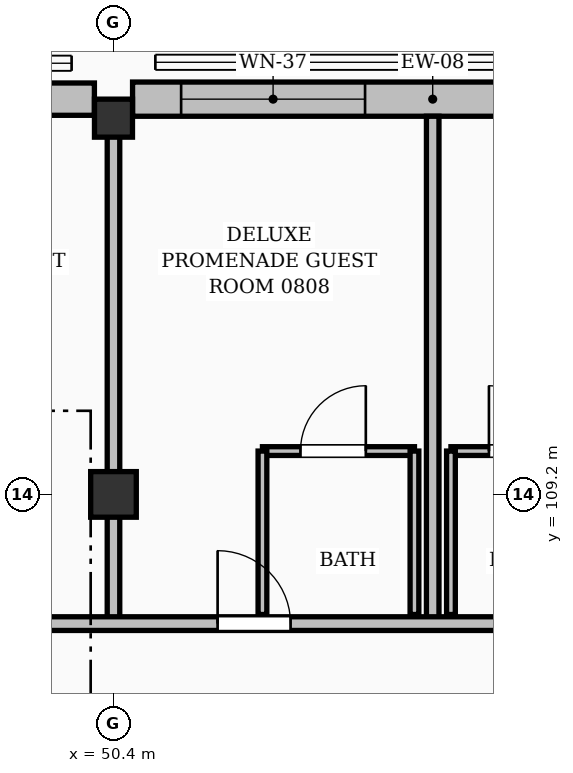
"""IFC4 building model, lengths in metres.
Left out: names, types, materials, properties, quantities, classifications, styles, units other than length and angle.
Written with IfcOpenShell. Run it as: python <this file> out.ifc"""

import sys

from ifc_helpers import new_model, si_unit, direction, frame, frame_2d, origin, origin_2d, place, context, subcontext, project, spatial, rectangle, extrude, element, fill, save


model = new_model("IFC4")
c1 = context("Model", 3, precision=1e-05, world=origin(), true_north=direction((0.0, 1.0)))
c2 = subcontext(c1, "Body", "Model", "MODEL_VIEW")
j1 = project(units=[si_unit("LENGTHUNIT", "METRE"), si_unit("PLANEANGLEUNIT", "RADIAN")], contexts=[c1])
p1 = place(None, origin())
s1 = spatial("IfcSite", under=j1, at=p1, CompositionType="ELEMENT")
p2 = place(p1, origin())
s2 = spatial("IfcBuilding", under=s1, at=p2, CompositionType="ELEMENT")
p3 = place(p2, frame((0.0, 0.0, 28.56)))
s3 = spatial("IfcBuildingStorey", under=s2, at=p3, CompositionType="ELEMENT", Elevation=28.56)
p4 = place(p3, frame((50.4, 109.2, 0.0), z_axis=(0.0, 0.0, 1.0), x_axis=(1.0, 0.0, 0.0)))
e1 = element("IfcColumn", 1, at=p4, inside=s3, PredefinedType="COLUMN", context=c2, shape_type="SweptSolid", body=[
    extrude(rectangle(XDim=0.6, YDim=0.6, at=origin_2d()), origin(), (0.0, 0.0, 1.0), 3.36),
])
p5 = place(p3, frame((50.4, 114.15, -0.315), z_axis=(0.0, 0.0, 1.0), x_axis=(1.0, 0.0, 0.0)))
e2 = element("IfcColumn", 2, at=p5, inside=s3, PredefinedType="COLUMN", context=c2, shape_type="SweptSolid", body=[
    extrude(rectangle(XDim=0.5, YDim=0.5, at=origin_2d()), origin(), (0.0, 0.0, 1.0), 3.675),
])
p6 = place(p3, frame((42.251, 114.4, 0.0), z_axis=(0.0, 0.0, 1.0), x_axis=(1.0, 0.0, 0.0)))
e3 = element("IfcWall", 3, at=p6, inside=s3, PredefinedType="SOLIDWALL", context=c2, shape_type="SweptSolid", body=[
    extrude(rectangle(XDim=7.898, YDim=0.425, at=frame_2d((3.949, 0.0))), origin(), (0.0, 0.0, 1.0), 2.494),
])
p7 = place(p6, frame((0.739, 0.0, 0.25)))
e4 = element("IfcOpeningElement", 4, at=p7, cuts=e3, PredefinedType="OPENING", context=c2, shape_type="SweptSolid", body=[
    extrude(rectangle(XDim=2.22, YDim=1.9, at=frame_2d((1.11, 0.95))), frame((0.0, 0.223, 0.0), z_axis=(0.0, -1.0, 0.0), x_axis=(1.0, 0.0, 0.0)), (0.0, 0.0, 1.0), 0.445),
])
p8 = place(p6, frame((4.839, 0.0, 0.25)))
e5 = element("IfcOpeningElement", 5, at=p8, cuts=e3, PredefinedType="OPENING", context=c2, shape_type="SweptSolid", body=[
    extrude(rectangle(XDim=2.42, YDim=1.9, at=frame_2d((1.21, 0.95))), frame((0.0, 0.223, 0.0), z_axis=(0.0, -1.0, 0.0), x_axis=(1.0, 0.0, 0.0)), (0.0, 0.0, 1.0), 0.445),
])
p9 = place(p3, frame((50.651, 114.4, 0.0), z_axis=(0.0, 0.0, 1.0), x_axis=(1.0, 0.0, 0.0)))
e6 = element("IfcWall", 6, at=p9, inside=s3, PredefinedType="SOLIDWALL", context=c2, shape_type="SweptSolid", body=[
    extrude(rectangle(XDim=7.898, YDim=0.45, at=frame_2d((3.949, 0.0))), origin(), (0.0, 0.0, 1.0), 2.494),
])
p10 = place(p9, frame((0.639, 0.0, 0.25)))
e7 = element("IfcOpeningElement", 7, at=p10, cuts=e6, PredefinedType="OPENING", context=c2, shape_type="SweptSolid", body=[
    extrude(rectangle(XDim=2.42, YDim=1.9, at=frame_2d((1.21, 0.95))), frame((0.0, 0.235, 0.0), z_axis=(0.0, -1.0, 0.0), x_axis=(1.0, 0.0, 0.0)), (0.0, 0.0, 1.0), 0.47),
])
p11 = place(p9, frame((4.859, 0.0, 0.25)))
e8 = element("IfcOpeningElement", 8, at=p11, cuts=e6, PredefinedType="OPENING", context=c2, shape_type="SweptSolid", body=[
    extrude(rectangle(XDim=2.38, YDim=2.0, at=frame_2d((1.19, 1.0))), frame((0.0, 0.235, 0.0), z_axis=(0.0, -1.0, 0.0), x_axis=(1.0, 0.0, 0.0)), (0.0, 0.0, 1.0), 0.47),
])
p12 = place(p3, frame((52.36, 109.77, 0.0), z_axis=(0.0, 0.0, 1.0), x_axis=(1.0, 0.0, 0.0)))
e9 = element("IfcWall", 9, at=p12, inside=s3, PredefinedType="PARTITIONING", context=c2, shape_type="SweptSolid", body=[
    extrude(rectangle(XDim=2.0, YDim=0.115, at=frame_2d((1.0, 0.0))), origin(), (0.0, 0.0, 1.0), 3.12),
])
p13 = place(p12, frame((0.5, 0.0, 0.0)))
e10 = element("IfcOpeningElement", 10, at=p13, cuts=e9, PredefinedType="OPENING", context=c2, shape_type="SweptSolid", body=[
    extrude(rectangle(XDim=0.86, YDim=2.05, at=frame_2d((0.43, 1.025))), frame((0.0, 0.067, 0.0), z_axis=(0.0, -1.0, 0.0), x_axis=(1.0, 0.0, 0.0)), (0.0, 0.0, 1.0), 0.135),
])
for number, where, z_axis, x_axis in (
    (11, (52.36, 107.62, 0.0), (0.0, 0.0, 1.0), (0.0, 1.0, 0.0)),
    (12, (54.36, 107.62, 0.0), (0.0, 0.0, 1.0), (0.0, 1.0, 0.0)),
):
    element("IfcWall", number, at=place(p3, frame(where, z_axis=z_axis, x_axis=x_axis)), inside=s3, PredefinedType="PARTITIONING", context=c2, shape_type="SweptSolid", body=[
        extrude(rectangle(XDim=2.15, YDim=0.115, at=frame_2d((1.075, 0.0))), origin(), (0.0, 0.0, 1.0), 3.12),
    ])
p14 = place(p3, frame((54.84, 109.77, 0.0), z_axis=(0.0, 0.0, 1.0), x_axis=(1.0, 0.0, 0.0)))
e13 = element("IfcWall", 13, at=p14, inside=s3, PredefinedType="PARTITIONING", context=c2, shape_type="SweptSolid", body=[
    extrude(rectangle(XDim=2.0, YDim=0.115, at=frame_2d((1.0, 0.0))), origin(), (0.0, 0.0, 1.0), 3.12),
])
p15 = place(p14, frame((0.5, 0.0, 0.0)))
e14 = element("IfcOpeningElement", 14, at=p15, cuts=e13, PredefinedType="OPENING", context=c2, shape_type="SweptSolid", body=[
    extrude(rectangle(XDim=0.86, YDim=2.05, at=frame_2d((0.43, 1.025))), frame((0.0, 0.067, 0.0), z_axis=(0.0, -1.0, 0.0), x_axis=(1.0, 0.0, 0.0)), (0.0, 0.0, 1.0), 0.135),
])
p16 = place(p3, frame((54.84, 107.62, 0.0), z_axis=(0.0, 0.0, 1.0), x_axis=(0.0, 1.0, 0.0)))
e15 = element("IfcWall", 15, at=p16, inside=s3, PredefinedType="PARTITIONING", context=c2, shape_type="SweptSolid", body=[
    extrude(rectangle(XDim=2.15, YDim=0.115, at=frame_2d((1.075, 0.0))), origin(), (0.0, 0.0, 1.0), 3.12),
])
p17 = place(p3, frame((54.6, 107.5, 0.0), z_axis=(0.0, 0.0, 1.0), x_axis=(0.0, 1.0, 0.0)))
e16 = element("IfcWall", 16, at=p17, inside=s3, PredefinedType="PARTITIONING", context=c2, shape_type="SweptSolid", body=[
    extrude(rectangle(XDim=6.675, YDim=0.165, at=frame_2d((3.337, 0.0))), origin(), (0.0, 0.0, 1.0), 3.12),
])
p18 = place(p3, frame((50.4, 107.5, 0.0), z_axis=(0.0, 0.0, 1.0), x_axis=(0.0, 1.0, 0.0)))
e17 = element("IfcWall", 17, at=p18, inside=s3, PredefinedType="PARTITIONING", context=c2, shape_type="SweptSolid", body=[
    extrude(rectangle(XDim=6.55, YDim=0.165, at=frame_2d((3.275, 0.0))), origin(), (0.0, 0.0, 1.0), 2.41),
])
p19 = place(p3, frame((40.66, 107.5, 0.0), z_axis=(0.0, 0.0, 1.0), x_axis=(1.0, 0.0, 0.0)))
e18 = element("IfcWall", 18, at=p19, inside=s3, PredefinedType="PARTITIONING", context=c2, shape_type="SweptSolid", body=[
    extrude(rectangle(XDim=26.378, YDim=0.18, at=frame_2d((13.189, 0.0))), origin(), (0.0, 0.0, 1.0), 3.12),
])
p20 = place(p19, frame((0.2, 0.0, 0.0)))
e19 = element("IfcOpeningElement", 19, at=p20, cuts=e18, PredefinedType="OPENING", context=c2, shape_type="SweptSolid", body=[
    extrude(rectangle(XDim=0.94, YDim=2.1, at=frame_2d((0.47, 1.05))), frame((0.0, 0.1, 0.0), z_axis=(0.0, -1.0, 0.0), x_axis=(1.0, 0.0, 0.0)), (0.0, 0.0, 1.0), 0.2),
])
p21 = place(p19, frame((2.71, 0.0, 0.0)))
e20 = element("IfcOpeningElement", 20, at=p21, cuts=e18, PredefinedType="OPENING", context=c2, shape_type="SweptSolid", body=[
    extrude(rectangle(XDim=0.96, YDim=2.15, at=frame_2d((0.48, 1.075))), frame((0.0, 0.1, 0.0), z_axis=(0.0, -1.0, 0.0), x_axis=(1.0, 0.0, 0.0)), (0.0, 0.0, 1.0), 0.2),
])
p22 = place(p19, frame((7.37, 0.0, 0.0)))
e21 = element("IfcOpeningElement", 21, at=p22, cuts=e18, PredefinedType="OPENING", context=c2, shape_type="SweptSolid", body=[
    extrude(rectangle(XDim=0.96, YDim=2.15, at=frame_2d((0.48, 1.075))), frame((0.0, 0.1, 0.0), z_axis=(0.0, -1.0, 0.0), x_axis=(1.0, 0.0, 0.0)), (0.0, 0.0, 1.0), 0.2),
])
p23 = place(p19, frame((11.11, 0.0, 0.0)))
e22 = element("IfcOpeningElement", 22, at=p23, cuts=e18, PredefinedType="OPENING", context=c2, shape_type="SweptSolid", body=[
    extrude(rectangle(XDim=0.96, YDim=2.15, at=frame_2d((0.48, 1.075))), frame((0.0, 0.1, 0.0), z_axis=(0.0, -1.0, 0.0), x_axis=(1.0, 0.0, 0.0)), (0.0, 0.0, 1.0), 0.2),
])
p24 = place(p19, frame((15.77, 0.0, 0.0)))
e23 = element("IfcOpeningElement", 23, at=p24, cuts=e18, PredefinedType="OPENING", context=c2, shape_type="SweptSolid", body=[
    extrude(rectangle(XDim=0.96, YDim=2.15, at=frame_2d((0.48, 1.075))), frame((0.0, 0.1, 0.0), z_axis=(0.0, -1.0, 0.0), x_axis=(1.0, 0.0, 0.0)), (0.0, 0.0, 1.0), 0.2),
])
p25 = place(p19, frame((19.51, 0.0, 0.0)))
e24 = element("IfcOpeningElement", 24, at=p25, cuts=e18, PredefinedType="OPENING", context=c2, shape_type="SweptSolid", body=[
    extrude(rectangle(XDim=0.96, YDim=2.15, at=frame_2d((0.48, 1.075))), frame((0.0, 0.1, 0.0), z_axis=(0.0, -1.0, 0.0), x_axis=(1.0, 0.0, 0.0)), (0.0, 0.0, 1.0), 0.2),
])
p26 = place(p19, frame((24.17, 0.0, 0.0)))
e25 = element("IfcOpeningElement", 25, at=p26, cuts=e18, PredefinedType="OPENING", context=c2, shape_type="SweptSolid", body=[
    extrude(rectangle(XDim=0.96, YDim=2.15, at=frame_2d((0.48, 1.075))), frame((0.0, 0.1, 0.0), z_axis=(0.0, -1.0, 0.0), x_axis=(1.0, 0.0, 0.0)), (0.0, 0.0, 1.0), 0.2),
])
p27 = place(p10, origin())
e26 = element("IfcWindow", 26, at=p27, inside=s3, PartitioningType="DOUBLE_PANEL_VERTICAL", PredefinedType="WINDOW", context=c2, shape_type="SweptSolid", body=[
    extrude(rectangle(XDim=2.42, YDim=1.9, at=frame_2d((1.21, 0.95))), frame((0.0, 0.03, 0.0), z_axis=(0.0, -1.0, 0.0), x_axis=(1.0, 0.0, 0.0)), (0.0, 0.0, 1.0), 0.06),
])
fill(e7, e26)
p28 = place(p13, origin())
e27 = element("IfcDoor", 27, at=p28, inside=s3, OperationType="SINGLE_SWING_RIGHT", PredefinedType="DOOR", context=c2, shape_type="SweptSolid", body=[
    extrude(rectangle(XDim=0.86, YDim=2.05, at=frame_2d((0.43, 1.025))), frame((0.0, 0.025, 0.0), z_axis=(0.0, -1.0, 0.0), x_axis=(1.0, 0.0, 0.0)), (0.0, 0.0, 1.0), 0.05),
])
fill(e10, e27)
p29 = place(p15, origin())
e28 = element("IfcDoor", 28, at=p29, inside=s3, OperationType="SINGLE_SWING_LEFT", PredefinedType="DOOR", context=c2, shape_type="SweptSolid", body=[
    extrude(rectangle(XDim=0.86, YDim=2.05, at=frame_2d((0.43, 1.025))), frame((0.0, 0.025, 0.0), z_axis=(0.0, -1.0, 0.0), x_axis=(1.0, 0.0, 0.0)), (0.0, 0.0, 1.0), 0.05),
])
fill(e14, e28)
p30 = place(p23, origin())
e29 = element("IfcDoor", 29, at=p30, inside=s3, OperationType="SINGLE_SWING_LEFT", PredefinedType="DOOR", context=c2, shape_type="SweptSolid", body=[
    extrude(rectangle(XDim=0.96, YDim=2.15, at=frame_2d((0.48, 1.075))), frame((0.0, 0.025, 0.0), z_axis=(0.0, -1.0, 0.0), x_axis=(1.0, 0.0, 0.0)), (0.0, 0.0, 1.0), 0.05),
])
fill(e22, e29)
save(model, sys.argv[1])
